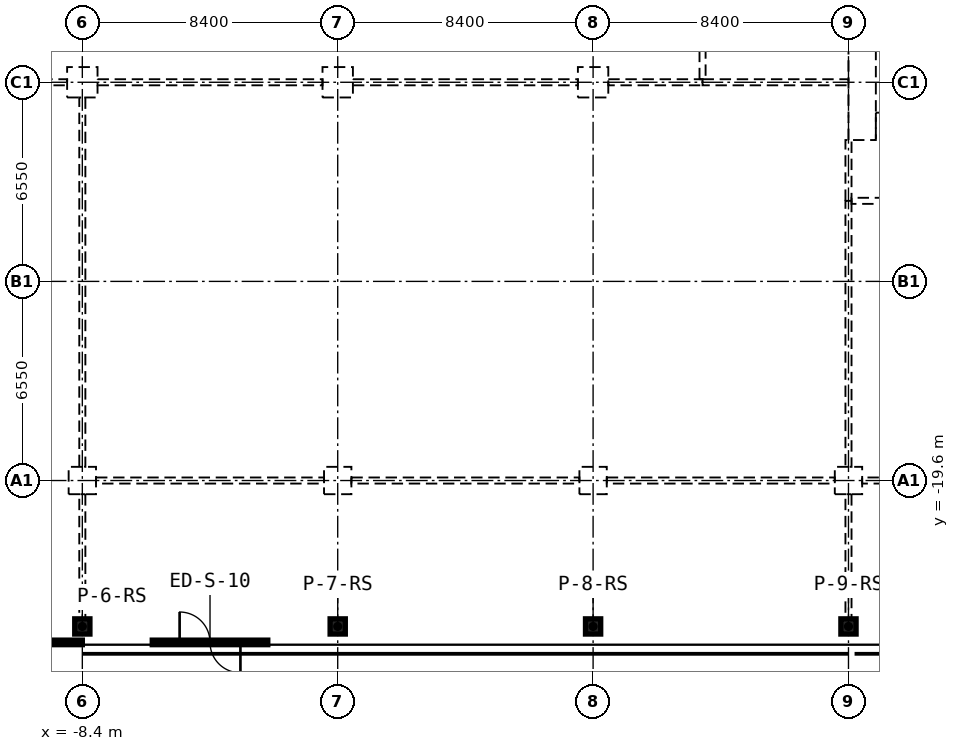
"""IFC4 building model, lengths in metres.
Left out: names, types, materials, properties, quantities, classifications, styles, units other than length and angle.
Written with IfcOpenShell. Run it as: python <this file> out.ifc"""

import sys

from ifc_helpers import new_model, si_unit, direction, frame, frame_2d, origin, origin_2d, place, context, subcontext, project, spatial, rectangle, hollow_rectangle, extrude, element, fill, save


model = new_model("IFC4")
c1 = context("Model", 3, precision=1e-05, world=origin(), true_north=direction((0.0, 1.0)))
c2 = subcontext(c1, "Body", "Model", "MODEL_VIEW")
j1 = project(units=[si_unit("LENGTHUNIT", "METRE"), si_unit("PLANEANGLEUNIT", "RADIAN")], contexts=[c1])
p1 = place(None, origin())
s1 = spatial("IfcSite", under=j1, at=p1, CompositionType="ELEMENT")
p2 = place(p1, origin())
s2 = spatial("IfcBuilding", under=s1, at=p2, CompositionType="ELEMENT")
p3 = place(p2, frame((0.0, 0.0, 9.0)))
s3 = spatial("IfcBuildingStorey", under=s2, at=p3, CompositionType="ELEMENT", Elevation=9.0)
p4 = place(p3, frame((-8.4, -19.6, 0.0), z_axis=(0.0, 0.0, 1.0), x_axis=(1.0, 0.0, 0.0)))
e1 = element("IfcColumn", 1, at=p4, inside=s3, PredefinedType="COLUMN", context=c2, shape_type="SweptSolid", body=[
    extrude(hollow_rectangle(XDim=0.9, YDim=0.9, WallThickness=0.036, at=origin_2d()), origin(), (0.0, 0.0, 1.0), 5.6),
])
p5 = place(p3, frame((-8.4, -6.5, 0.0), z_axis=(0.0, 0.0, 1.0), x_axis=(1.0, 0.0, 0.0)))
e2 = element("IfcColumn", 2, at=p5, inside=s3, PredefinedType="COLUMN", context=c2, shape_type="SweptSolid", body=[
    extrude(hollow_rectangle(XDim=1.0, YDim=1.0, WallThickness=0.04, at=origin_2d()), origin(), (0.0, 0.0, 1.0), 5.6),
])
p6 = place(p3, frame((0.0, -19.6, 0.0), z_axis=(0.0, 0.0, 1.0), x_axis=(1.0, 0.0, 0.0)))
e3 = element("IfcColumn", 3, at=p6, inside=s3, PredefinedType="COLUMN", context=c2, shape_type="SweptSolid", body=[
    extrude(hollow_rectangle(XDim=0.9, YDim=0.9, WallThickness=0.036, at=origin_2d()), origin(), (0.0, 0.0, 1.0), 5.6),
])
p7 = place(p3, frame((0.0, -6.5, 0.0), z_axis=(0.0, 0.0, 1.0), x_axis=(1.0, 0.0, 0.0)))
e4 = element("IfcColumn", 4, at=p7, inside=s3, PredefinedType="COLUMN", context=c2, shape_type="SweptSolid", body=[
    extrude(hollow_rectangle(XDim=1.0, YDim=1.0, WallThickness=0.04, at=origin_2d()), origin(), (0.0, 0.0, 1.0), 5.6),
])
p8 = place(p3, frame((8.4, -19.6, 0.0), z_axis=(0.0, 0.0, 1.0), x_axis=(1.0, 0.0, 0.0)))
e5 = element("IfcColumn", 5, at=p8, inside=s3, PredefinedType="COLUMN", context=c2, shape_type="SweptSolid", body=[
    extrude(hollow_rectangle(XDim=0.9, YDim=0.9, WallThickness=0.036, at=origin_2d()), origin(), (0.0, 0.0, 1.0), 5.6),
])
p9 = place(p3, frame((8.4, -6.5, 0.0), z_axis=(0.0, 0.0, 1.0), x_axis=(1.0, 0.0, 0.0)))
e6 = element("IfcColumn", 6, at=p9, inside=s3, PredefinedType="COLUMN", context=c2, shape_type="SweptSolid", body=[
    extrude(hollow_rectangle(XDim=1.0, YDim=1.0, WallThickness=0.04, at=origin_2d()), origin(), (0.0, 0.0, 1.0), 5.6),
])
p10 = place(p3, frame((16.8, -19.6, 0.0), z_axis=(0.0, 0.0, 1.0), x_axis=(1.0, 0.0, 0.0)))
e7 = element("IfcColumn", 7, at=p10, inside=s3, PredefinedType="COLUMN", context=c2, shape_type="SweptSolid", body=[
    extrude(hollow_rectangle(XDim=0.9, YDim=0.9, WallThickness=0.036, at=origin_2d()), origin(), (0.0, 0.0, 1.0), 5.6),
])
for number, where, z_axis, x_axis in (
    (8, (-8.4, -24.4, 0.0), (0.0, 0.0, 1.0), (1.0, 0.0, 0.0)),
    (9, (0.0, -24.4, 0.0), (0.0, 0.0, 1.0), (1.0, 0.0, 0.0)),
    (10, (8.4, -24.4, 0.0), (0.0, 0.0, 1.0), (1.0, 0.0, 0.0)),
    (11, (16.8, -24.4, 0.0), (0.0, 0.0, 1.0), (1.0, 0.0, 0.0)),
):
    element("IfcColumn", number, at=place(p3, frame(where, z_axis=z_axis, x_axis=x_axis)), inside=s3, PredefinedType="COLUMN", context=c2, shape_type="SweptSolid", body=[
        extrude(hollow_rectangle(XDim=0.5, YDim=0.5, WallThickness=0.019, InnerFilletRadius=0.029, OuterFilletRadius=0.048, at=origin_2d()), origin(), (0.0, 0.0, 1.0), 5.6),
    ])
p11 = place(p3, frame((17.25, -8.4, 0.0), z_axis=(0.0, 0.0, 1.0), x_axis=(0.0, 1.0, 0.0)))
e12 = element("IfcWall", 12, at=p11, inside=s3, PredefinedType="SHEAR", context=c2, shape_type="SweptSolid", body=[
    extrude(rectangle(XDim=16.8, YDim=0.9, at=frame_2d((8.4, 0.0))), origin(), (0.0, 0.0, 1.0), 5.6),
])
p12 = place(p11, frame((3.4, 0.0, 0.0)))
e13 = element("IfcOpeningElement", 13, at=p12, cuts=e12, PredefinedType="OPENING", context=c2, shape_type="SweptSolid", body=[
    extrude(rectangle(XDim=1.6, YDim=2.1, at=frame_2d((0.8, 1.05))), frame((0.0, 0.46, 0.0), z_axis=(0.0, -1.0, 0.0), x_axis=(1.0, 0.0, 0.0)), (0.0, 0.0, 1.0), 0.92),
])
p13 = place(p11, frame((9.6, 0.0, 0.0)))
e14 = element("IfcOpeningElement", 14, at=p13, cuts=e12, PredefinedType="OPENING", context=c2, shape_type="SweptSolid", body=[
    extrude(rectangle(XDim=1.6, YDim=2.1, at=frame_2d((0.8, 1.05))), frame((0.0, 0.46, 0.0), z_axis=(0.0, -1.0, 0.0), x_axis=(1.0, 0.0, 0.0)), (0.0, 0.0, 1.0), 0.92),
])
p14 = place(p11, frame((11.8, 0.0, 0.0)))
e15 = element("IfcOpeningElement", 15, at=p14, cuts=e12, PredefinedType="OPENING", context=c2, shape_type="SweptSolid", body=[
    extrude(rectangle(XDim=1.6, YDim=2.1, at=frame_2d((0.8, 1.05))), frame((0.0, 0.46, 0.0), z_axis=(0.0, -1.0, 0.0), x_axis=(1.0, 0.0, 0.0)), (0.0, 0.0, 1.0), 0.92),
])
p15 = place(p3, frame((17.7, -7.95, 0.0), z_axis=(0.0, 0.0, 1.0), x_axis=(1.0, 0.0, 0.0)))
e16 = element("IfcWall", 16, at=p15, inside=s3, PredefinedType="SHEAR", context=c2, shape_type="SweptSolid", body=[
    extrude(rectangle(XDim=15.0, YDim=0.9, at=frame_2d((7.5, 0.0))), origin(), (0.0, 0.0, 1.0), 5.6),
])
p16 = place(p15, frame((2.55, 0.0, 0.0)))
e17 = element("IfcOpeningElement", 17, at=p16, cuts=e16, PredefinedType="OPENING", context=c2, shape_type="SweptSolid", body=[
    extrude(rectangle(XDim=1.0, YDim=2.1, at=frame_2d((0.5, 1.05))), frame((0.0, 0.46, 0.0), z_axis=(0.0, -1.0, 0.0), x_axis=(1.0, 0.0, 0.0)), (0.0, 0.0, 1.0), 0.92),
])
p17 = place(p3, frame((16.8, -10.4, 0.0), z_axis=(0.0, 0.0, 1.0), x_axis=(0.0, 1.0, 0.0)))
e18 = element("IfcWall", 18, at=p17, inside=s3, PredefinedType="PARTITIONING", context=c2, shape_type="SweptSolid", body=[
    extrude(rectangle(XDim=2.0, YDim=0.2, at=frame_2d((1.0, 0.0))), origin(), (0.0, 0.0, 1.0), 5.6),
])
p18 = place(p3, frame((39.0, -10.4, 0.0), z_axis=(0.0, 0.0, 1.0), x_axis=(-1.0, 0.0, 0.0)))
e19 = element("IfcWall", 19, at=p18, inside=s3, PredefinedType="PARTITIONING", context=c2, shape_type="SweptSolid", body=[
    extrude(rectangle(XDim=22.1, YDim=0.2, at=frame_2d((11.05, 0.0))), origin(), (0.0, 0.0, 1.0), 5.6),
])
p19 = place(p18, frame((8.3, 0.0, 0.0)))
e20 = element("IfcOpeningElement", 20, at=p19, cuts=e19, PredefinedType="OPENING", context=c2, shape_type="SweptSolid", body=[
    extrude(rectangle(XDim=1.4, YDim=2.1, at=frame_2d((0.7, 1.05))), frame((0.0, 0.11, 0.0), z_axis=(0.0, -1.0, 0.0), x_axis=(1.0, 0.0, 0.0)), (0.0, 0.0, 1.0), 0.22),
])
p20 = place(p3, frame((-7.95, -19.6, 0.0), z_axis=(0.0, 0.0, 1.0), x_axis=(1.0, 0.0, 0.0)))
e21 = element("IfcWall", 21, at=p20, inside=s3, PredefinedType="PARTITIONING", context=c2, shape_type="SweptSolid", body=[
    extrude(rectangle(XDim=7.5, YDim=0.2, at=frame_2d((3.75, 0.0))), origin(), (0.0, 0.0, 1.0), 5.6),
])
p21 = place(p20, frame((2.25, 0.0, 0.0)))
e22 = element("IfcOpeningElement", 22, at=p21, cuts=e21, PredefinedType="OPENING", context=c2, shape_type="SweptSolid", body=[
    extrude(rectangle(XDim=3.0, YDim=2.1, at=frame_2d((1.5, 1.05))), frame((0.0, 0.11, 0.0), z_axis=(0.0, -1.0, 0.0), x_axis=(1.0, 0.0, 0.0)), (0.0, 0.0, 1.0), 0.22),
])
p22 = place(p3, frame((0.45, -19.6, 0.0), z_axis=(0.0, 0.0, 1.0), x_axis=(1.0, 0.0, 0.0)))
e23 = element("IfcWall", 23, at=p22, inside=s3, PredefinedType="PARTITIONING", context=c2, shape_type="SweptSolid", body=[
    extrude(rectangle(XDim=7.5, YDim=0.2, at=frame_2d((3.75, 0.0))), origin(), (0.0, 0.0, 1.0), 5.6),
])
p23 = place(p22, frame((2.25, 0.0, 0.0)))
e24 = element("IfcOpeningElement", 24, at=p23, cuts=e23, PredefinedType="OPENING", context=c2, shape_type="SweptSolid", body=[
    extrude(rectangle(XDim=3.0, YDim=2.1, at=frame_2d((1.5, 1.05))), frame((0.0, 0.11, 0.0), z_axis=(0.0, -1.0, 0.0), x_axis=(1.0, 0.0, 0.0)), (0.0, 0.0, 1.0), 0.22),
])
p24 = place(p3, frame((8.85, -19.6, 0.0), z_axis=(0.0, 0.0, 1.0), x_axis=(1.0, 0.0, 0.0)))
e25 = element("IfcWall", 25, at=p24, inside=s3, PredefinedType="PARTITIONING", context=c2, shape_type="SweptSolid", body=[
    extrude(rectangle(XDim=7.5, YDim=0.2, at=frame_2d((3.75, 0.0))), origin(), (0.0, 0.0, 1.0), 5.6),
])
p25 = place(p24, frame((2.25, 0.0, 0.0)))
e26 = element("IfcOpeningElement", 26, at=p25, cuts=e25, PredefinedType="OPENING", context=c2, shape_type="SweptSolid", body=[
    extrude(rectangle(XDim=3.0, YDim=2.1, at=frame_2d((1.5, 1.05))), frame((0.0, 0.11, 0.0), z_axis=(0.0, -1.0, 0.0), x_axis=(1.0, 0.0, 0.0)), (0.0, 0.0, 1.0), 0.22),
])
p26 = place(p3, frame((16.8, -20.05, 0.0), z_axis=(0.0, 0.0, 1.0), x_axis=(0.0, -1.0, 0.0)))
e27 = element("IfcWall", 27, at=p26, inside=s3, PredefinedType="PARTITIONING", context=c2, shape_type="SweptSolid", body=[
    extrude(rectangle(XDim=4.1, YDim=0.2, at=frame_2d((2.05, 0.0))), origin(), (0.0, 0.0, 1.0), 5.6),
])
p27 = place(p3, frame((12.0, -6.5, 0.0), z_axis=(0.0, 0.0, 1.0), x_axis=(1.0, 0.0, 0.0)))
e28 = element("IfcWall", 28, at=p27, inside=s3, PredefinedType="PARTITIONING", context=c2, shape_type="SweptSolid", body=[
    extrude(rectangle(XDim=4.8, YDim=0.2, at=frame_2d((2.4, 0.0))), origin(), (0.0, 0.0, 1.0), 5.6),
])
p28 = place(p3, frame((-7.9, -6.5, 0.0), z_axis=(0.0, 0.0, 1.0), x_axis=(1.0, 0.0, 0.0)))
e29 = element("IfcWall", 29, at=p28, inside=s3, PredefinedType="PARTITIONING", context=c2, shape_type="SweptSolid", body=[
    extrude(rectangle(XDim=7.4, YDim=0.2, at=frame_2d((3.7, 0.0))), origin(), (0.0, 0.0, 1.0), 5.6),
])
p29 = place(p28, frame((2.5, 0.0, 0.0)))
e30 = element("IfcOpeningElement", 30, at=p29, cuts=e29, PredefinedType="OPENING", context=c2, shape_type="SweptSolid", body=[
    extrude(rectangle(XDim=2.4, YDim=2.1, at=frame_2d((1.2, 1.05))), frame((0.0, 0.11, 0.0), z_axis=(0.0, -1.0, 0.0), x_axis=(1.0, 0.0, 0.0)), (0.0, 0.0, 1.0), 0.22),
])
p30 = place(p3, frame((0.5, -6.5, 0.0), z_axis=(0.0, 0.0, 1.0), x_axis=(1.0, 0.0, 0.0)))
e31 = element("IfcWall", 31, at=p30, inside=s3, PredefinedType="PARTITIONING", context=c2, shape_type="SweptSolid", body=[
    extrude(rectangle(XDim=7.4, YDim=0.2, at=frame_2d((3.7, 0.0))), origin(), (0.0, 0.0, 1.0), 5.6),
])
p31 = place(p30, frame((2.5, 0.0, 0.0)))
e32 = element("IfcOpeningElement", 32, at=p31, cuts=e31, PredefinedType="OPENING", context=c2, shape_type="SweptSolid", body=[
    extrude(rectangle(XDim=2.4, YDim=2.1, at=frame_2d((1.2, 1.05))), frame((0.0, 0.11, 0.0), z_axis=(0.0, -1.0, 0.0), x_axis=(1.0, 0.0, 0.0)), (0.0, 0.0, 1.0), 0.22),
])
p32 = place(p3, frame((8.9, -6.5, 0.0), z_axis=(0.0, 0.0, 1.0), x_axis=(1.0, 0.0, 0.0)))
e33 = element("IfcWall", 33, at=p32, inside=s3, PredefinedType="PARTITIONING", context=c2, shape_type="SweptSolid", body=[
    extrude(rectangle(XDim=3.1, YDim=0.2, at=frame_2d((1.55, 0.0))), origin(), (0.0, 0.0, 1.0), 5.6),
])
p33 = place(p3, frame((16.8, -10.4, 0.0), z_axis=(0.0, 0.0, 1.0), x_axis=(0.0, -1.0, 0.0)))
e34 = element("IfcWall", 34, at=p33, inside=s3, PredefinedType="PARTITIONING", context=c2, shape_type="SweptSolid", body=[
    extrude(rectangle(XDim=8.75, YDim=0.2, at=frame_2d((4.375, 0.0))), origin(), (0.0, 0.0, 1.0), 5.6),
])
p34 = place(p33, frame((4.9, 0.0, 0.0)))
e35 = element("IfcOpeningElement", 35, at=p34, cuts=e34, PredefinedType="OPENING", context=c2, shape_type="SweptSolid", body=[
    extrude(rectangle(XDim=2.0, YDim=2.1, at=frame_2d((1.0, 1.05))), frame((0.0, 0.11, 0.0), z_axis=(0.0, -1.0, 0.0), x_axis=(1.0, 0.0, 0.0)), (0.0, 0.0, 1.0), 0.22),
])
p35 = place(p3, frame((12.0, -6.4, 0.0), z_axis=(0.0, 0.0, 1.0), x_axis=(0.0, 1.0, 0.0)))
e36 = element("IfcWall", 36, at=p35, inside=s3, PredefinedType="PARTITIONING", context=c2, shape_type="SweptSolid", body=[
    extrude(rectangle(XDim=12.8, YDim=0.2, at=frame_2d((6.4, 0.0))), origin(), (0.0, 0.0, 1.0), 5.6),
])
p36 = place(p35, frame((5.2, 0.0, 0.0)))
e37 = element("IfcOpeningElement", 37, at=p36, cuts=e36, PredefinedType="OPENING", context=c2, shape_type="SweptSolid", body=[
    extrude(rectangle(XDim=2.4, YDim=2.1, at=frame_2d((1.2, 1.05))), frame((0.0, 0.11, 0.0), z_axis=(0.0, -1.0, 0.0), x_axis=(1.0, 0.0, 0.0)), (0.0, 0.0, 1.0), 0.22),
])
p37 = place(p3, frame((24.75, -19.6, 0.0), z_axis=(0.0, 0.0, 1.0), x_axis=(-1.0, 0.0, 0.0)))
e38 = element("IfcWall", 38, at=p37, inside=s3, PredefinedType="PARTITIONING", context=c2, shape_type="SweptSolid", body=[
    extrude(rectangle(XDim=7.5, YDim=0.2, at=frame_2d((3.75, 0.0))), origin(), (0.0, 0.0, 1.0), 5.6),
])
p38 = place(p37, frame((2.55, 0.0, 0.0)))
e39 = element("IfcOpeningElement", 39, at=p38, cuts=e38, PredefinedType="OPENING", context=c2, shape_type="SweptSolid", body=[
    extrude(rectangle(XDim=2.4, YDim=2.1, at=frame_2d((1.2, 1.05))), frame((0.0, 0.11, 0.0), z_axis=(0.0, -1.0, 0.0), x_axis=(1.0, 0.0, 0.0)), (0.0, 0.0, 1.0), 0.22),
])
p39 = place(p3, frame((-8.4, -20.05, 0.0), z_axis=(0.0, 0.0, 1.0), x_axis=(0.0, -1.0, 0.0)))
e40 = element("IfcWall", 40, at=p39, inside=s3, PredefinedType="PARTITIONING", context=c2, shape_type="SweptSolid", body=[
    extrude(rectangle(XDim=4.1, YDim=0.2, at=frame_2d((2.05, 0.0))), origin(), (0.0, 0.0, 1.0), 5.6),
])
p40 = place(p39, frame((1.35, 0.0, 0.0)))
e41 = element("IfcOpeningElement", 41, at=p40, cuts=e40, PredefinedType="OPENING", context=c2, shape_type="SweptSolid", body=[
    extrude(rectangle(XDim=1.2, YDim=2.1, at=frame_2d((0.6, 1.05))), frame((0.0, 0.11, 0.0), z_axis=(0.0, -1.0, 0.0), x_axis=(1.0, 0.0, 0.0)), (0.0, 0.0, 1.0), 0.22),
])
p41 = place(p3, frame((-8.4, -7.0, 0.0), z_axis=(0.0, 0.0, 1.0), x_axis=(0.0, -1.0, 0.0)))
e42 = element("IfcWall", 42, at=p41, inside=s3, PredefinedType="PARTITIONING", context=c2, shape_type="SweptSolid", body=[
    extrude(rectangle(XDim=12.15, YDim=0.2, at=frame_2d((6.075, 0.0))), origin(), (0.0, 0.0, 1.0), 5.6),
])
p42 = place(p3, frame((-12.0, -6.5, 0.0), z_axis=(0.0, 0.0, 1.0), x_axis=(1.0, 0.0, 0.0)))
e43 = element("IfcWall", 43, at=p42, inside=s3, PredefinedType="PARTITIONING", context=c2, shape_type="SweptSolid", body=[
    extrude(rectangle(XDim=3.1, YDim=0.2, at=frame_2d((1.55, 0.0))), origin(), (0.0, 0.0, 1.0), 5.6),
])
p43 = place(p3, frame((-2.3, -24.925, 0.0), z_axis=(0.0, 0.0, 1.0), x_axis=(-1.0, 0.0, 0.0)))
e44 = element("IfcWall", 44, at=p43, inside=s3, PredefinedType="STANDARD", context=c2, shape_type="SweptSolid", body=[
    extrude(rectangle(XDim=3.8, YDim=0.15, at=frame_2d((1.9, 0.0))), origin(), (0.0, 0.0, 1.0), 5.6),
])
p44 = place(p43, frame((0.9, 0.0, 0.0)))
e45 = element("IfcOpeningElement", 45, at=p44, cuts=e44, PredefinedType="OPENING", context=c2, shape_type="SweptSolid", body=[
    extrude(rectangle(XDim=2.0, YDim=2.1, at=frame_2d((1.0, 1.05))), frame((0.0, 0.085, 0.0), z_axis=(0.0, -1.0, 0.0), x_axis=(1.0, 0.0, 0.0)), (0.0, 0.0, 1.0), 0.17),
])
p45 = place(p3, frame((-8.4, -24.925, 0.0), z_axis=(0.0, 0.0, 1.0), x_axis=(-1.0, 0.0, 0.0)))
e46 = element("IfcWall", 46, at=p45, inside=s3, PredefinedType="STANDARD", context=c2, shape_type="SweptSolid", body=[
    extrude(rectangle(XDim=8.6, YDim=0.15, at=frame_2d((4.3, 0.0))), origin(), (0.0, 0.0, 1.0), 5.6),
])
p46 = place(p29, origin())
e47 = element("IfcDoor", 47, at=p46, inside=s3, OperationType="DOUBLE_DOOR_DOUBLE_SWING", PredefinedType="DOOR", context=c2, shape_type="SweptSolid", body=[
    extrude(rectangle(XDim=2.4, YDim=2.1, at=frame_2d((1.2, 1.05))), frame((0.0, 0.025, 0.0), z_axis=(0.0, -1.0, 0.0), x_axis=(1.0, 0.0, 0.0)), (0.0, 0.0, 1.0), 0.05),
])
fill(e30, e47)
p47 = place(p31, origin())
e48 = element("IfcDoor", 48, at=p47, inside=s3, OperationType="DOUBLE_DOOR_DOUBLE_SWING", PredefinedType="DOOR", context=c2, shape_type="SweptSolid", body=[
    extrude(rectangle(XDim=2.4, YDim=2.1, at=frame_2d((1.2, 1.05))), frame((0.0, 0.025, 0.0), z_axis=(0.0, -1.0, 0.0), x_axis=(1.0, 0.0, 0.0)), (0.0, 0.0, 1.0), 0.05),
])
fill(e32, e48)
p48 = place(p21, origin())
e49 = element("IfcDoor", 49, at=p48, inside=s3, OperationType="DOUBLE_DOOR_DOUBLE_SWING", PredefinedType="DOOR", context=c2, shape_type="SweptSolid", body=[
    extrude(rectangle(XDim=3.0, YDim=2.1, at=frame_2d((1.5, 1.05))), frame((0.0, 0.025, 0.0), z_axis=(0.0, -1.0, 0.0), x_axis=(1.0, 0.0, 0.0)), (0.0, 0.0, 1.0), 0.05),
])
fill(e22, e49)
p49 = place(p23, origin())
e50 = element("IfcDoor", 50, at=p49, inside=s3, OperationType="DOUBLE_DOOR_DOUBLE_SWING", PredefinedType="DOOR", context=c2, shape_type="SweptSolid", body=[
    extrude(rectangle(XDim=3.0, YDim=2.1, at=frame_2d((1.5, 1.05))), frame((0.0, 0.025, 0.0), z_axis=(0.0, -1.0, 0.0), x_axis=(1.0, 0.0, 0.0)), (0.0, 0.0, 1.0), 0.05),
])
fill(e24, e50)
p50 = place(p25, origin())
e51 = element("IfcDoor", 51, at=p50, inside=s3, OperationType="DOUBLE_DOOR_DOUBLE_SWING", PredefinedType="DOOR", context=c2, shape_type="SweptSolid", body=[
    extrude(rectangle(XDim=3.0, YDim=2.1, at=frame_2d((1.5, 1.05))), frame((0.0, 0.025, 0.0), z_axis=(0.0, -1.0, 0.0), x_axis=(1.0, 0.0, 0.0)), (0.0, 0.0, 1.0), 0.05),
])
fill(e26, e51)
p51 = place(p40, origin())
e52 = element("IfcDoor", 52, at=p51, inside=s3, OperationType="SINGLE_SWING_RIGHT", PredefinedType="DOOR", context=c2, shape_type="SweptSolid", body=[
    extrude(rectangle(XDim=1.2, YDim=2.1, at=frame_2d((0.6, 1.05))), frame((0.0, 0.025, 0.0), z_axis=(0.0, -1.0, 0.0), x_axis=(1.0, 0.0, 0.0)), (0.0, 0.0, 1.0), 0.05),
])
fill(e41, e52)
p52 = place(p34, origin())
e53 = element("IfcDoor", 53, at=p52, inside=s3, OperationType="DOUBLE_DOOR_DOUBLE_SWING", PredefinedType="DOOR", context=c2, shape_type="SweptSolid", body=[
    extrude(rectangle(XDim=2.0, YDim=2.1, at=frame_2d((1.0, 1.05))), frame((0.0, 0.025, 0.0), z_axis=(0.0, -1.0, 0.0), x_axis=(1.0, 0.0, 0.0)), (0.0, 0.0, 1.0), 0.05),
])
fill(e35, e53)
p53 = place(p44, origin())
e54 = element("IfcDoor", 54, at=p53, inside=s3, OperationType="DOUBLE_DOOR_DOUBLE_SWING", PredefinedType="DOOR", context=c2, shape_type="SweptSolid", body=[
    extrude(rectangle(XDim=2.0, YDim=2.1, at=frame_2d((1.0, 1.05))), frame((0.0, 0.025, 0.0), z_axis=(0.0, -1.0, 0.0), x_axis=(1.0, 0.0, 0.0)), (0.0, 0.0, 1.0), 0.05),
])
fill(e45, e54)
save(model, sys.argv[1])
